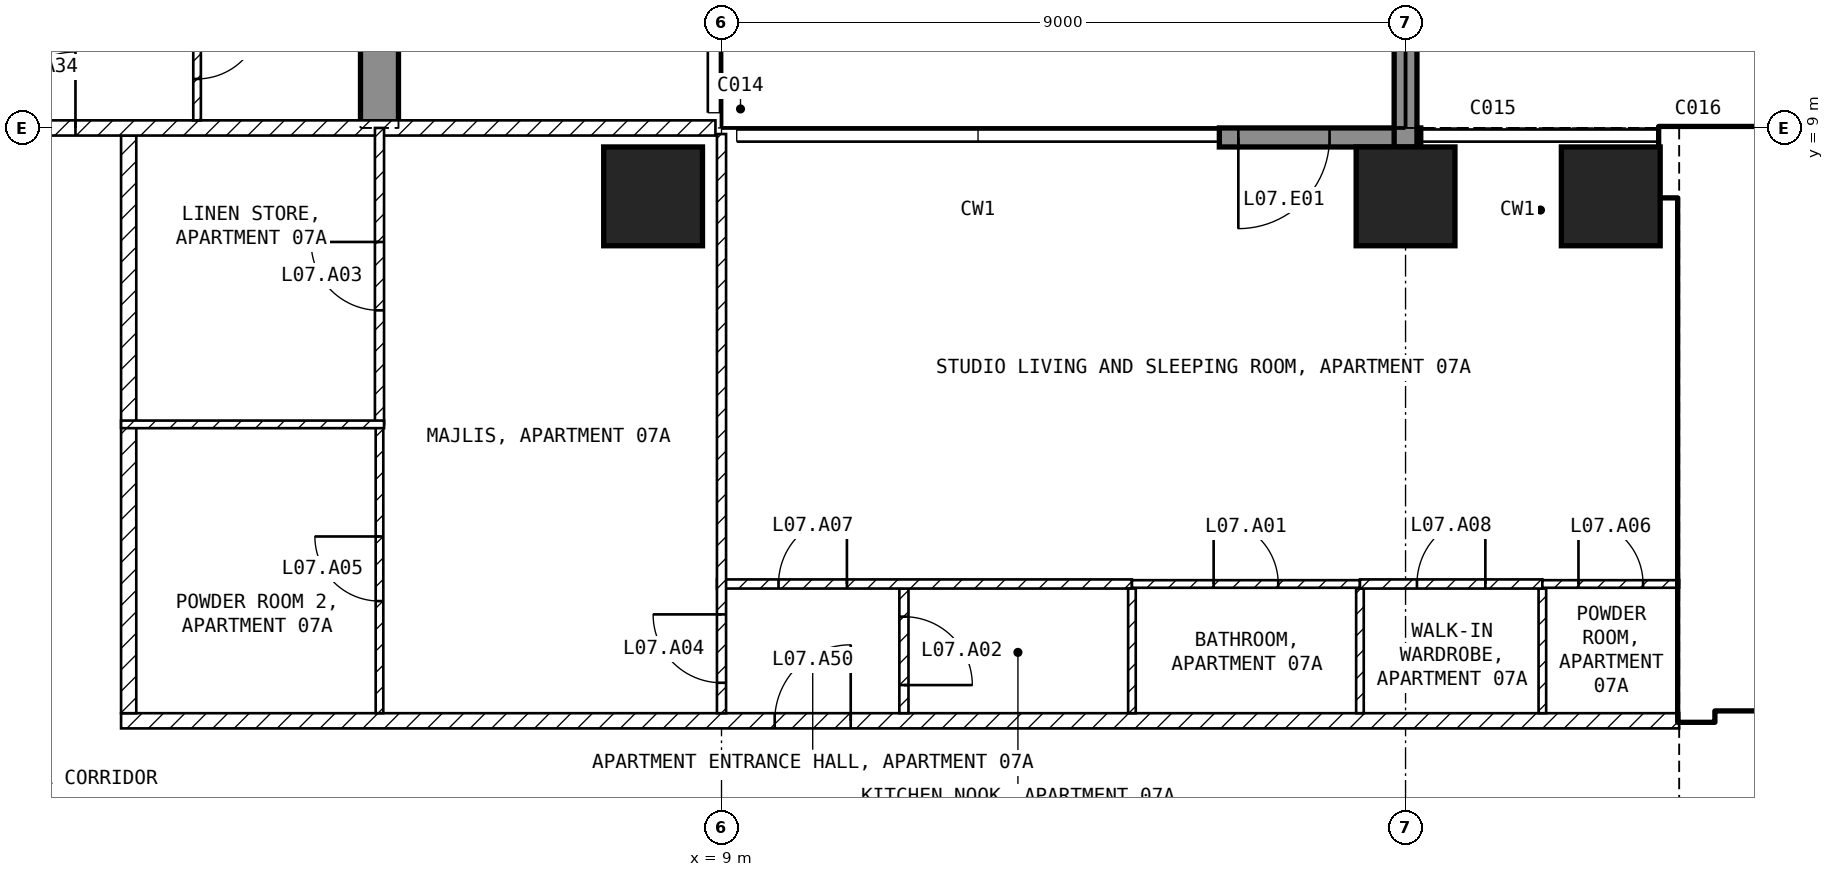
"""IFC4 building model, lengths in metres.
Left out: names, types, materials, properties, quantities, classifications, styles, units other than length and angle.
Written with IfcOpenShell. Run it as: python <this file> out.ifc"""

import sys

from ifc_helpers import new_model, si_unit, direction, frame, frame_2d, origin, origin_2d, place, context, subcontext, project, spatial, polyline, rectangle, outline, extrude, element, fill, save


model = new_model("IFC4")
c1 = context("Model", 3, precision=1e-05, world=origin(), true_north=direction((0.0, 1.0)))
c2 = subcontext(c1, "Body", "Model", "MODEL_VIEW")
j1 = project(units=[si_unit("LENGTHUNIT", "METRE"), si_unit("PLANEANGLEUNIT", "RADIAN")], contexts=[c1])
p1 = place(None, origin())
s1 = spatial("IfcSite", under=j1, at=p1, CompositionType="ELEMENT")
p2 = place(p1, origin())
s2 = spatial("IfcBuilding", under=s1, at=p2, CompositionType="ELEMENT")
p3 = place(p2, frame((0.0, 0.0, 43.5)))
s3 = spatial("IfcBuildingStorey", under=s2, at=p3, CompositionType="ELEMENT", Elevation=43.5)
for number, where, z_axis, x_axis in (
    (1, (8.1, 8.1, -0.25), (0.0, 0.0, 1.0), (1.0, 0.0, 0.0)),
    (2, (18.0, 8.1, -0.25), (0.0, 0.0, 1.0), (1.0, 0.0, 0.0)),
    (3, (20.7, 8.1, -0.25), (0.0, 0.0, 1.0), (1.0, 0.0, 0.0)),
):
    element("IfcColumn", number, at=place(p3, frame(where, z_axis=z_axis, x_axis=x_axis)), inside=s3, PredefinedType="COLUMN", context=c2, shape_type="SweptSolid", body=[
        extrude(rectangle(XDim=1.3, YDim=1.3, at=origin_2d()), origin(), (0.0, 0.0, 1.0), 3.5),
    ])
p4 = place(p3, frame((4.25, 9.0, -0.25), z_axis=(1.0, 0.0, 0.0), x_axis=(0.0, 1.0, 0.0)))
e4 = element("IfcWall", 4, at=p4, inside=s3, PredefinedType="SHEAR", context=c2, shape_type="SweptSolid", body=[
    extrude(outline(polyline([(0.0, 0.0), (2.1, 0.0), (2.1, 2.65), (4.5, 2.65), (4.5, 0.0), (9.9, 0.0), (9.9, 2.65), (12.3, 2.65), (12.3, 0.0), (16.45, 0.0), (16.45, 3.5), (0.0, 3.5), (0.0, 0.0)])), origin(), (0.0, 0.0, 1.0), 0.5),
])
p5 = place(p3, frame((18.2, 8.875, 0.0), z_axis=(0.0, 0.0, 1.0), x_axis=(-1.0, 0.0, 0.0)))
e5 = element("IfcWall", 5, at=p5, inside=s3, PredefinedType="SOLIDWALL", context=c2, shape_type="SweptSolid", body=[
    extrude(rectangle(XDim=2.65, YDim=0.25, at=frame_2d((1.325, 0.0))), origin(), (0.0, 0.0, 1.0), 3.25),
])
p6 = place(p5, frame((1.2, 0.0, 0.0)))
e6 = element("IfcOpeningElement", 6, at=p6, cuts=e5, PredefinedType="OPENING", context=c2, shape_type="SweptSolid", body=[
    extrude(rectangle(XDim=1.2, YDim=2.4, at=frame_2d((0.6, 1.2))), frame((0.0, 0.135, 0.0), z_axis=(0.0, -1.0, 0.0), x_axis=(1.0, 0.0, 0.0)), (0.0, 0.0, 1.0), 0.27),
])
p7 = place(p3, frame((18.0, 8.75, 0.0), z_axis=(0.0, 0.0, 1.0), x_axis=(0.0, 1.0, 0.0)))
e7 = element("IfcWall", 7, at=p7, inside=s3, PredefinedType="SOLIDWALL", context=c2, shape_type="SweptSolid", body=[
    extrude(rectangle(XDim=2.95, YDim=0.3, at=frame_2d((1.475, 0.0))), origin(), (0.0, 0.0, 1.0), 3.25),
])
p8 = place(p3, frame((21.35, 8.55, 0.0), z_axis=(0.0, 0.0, 1.0), x_axis=(1.0, 0.0, 0.0)))
e8 = element("IfcWall", 8, at=p8, inside=s3, PredefinedType="SHEAR", context=c2, shape_type="SweptSolid", body=[
    extrude(rectangle(XDim=10.15, YDim=0.9, at=frame_2d((5.075, 0.0))), origin(), (0.0, 0.0, 1.0), 3.25),
])
p9 = place(p3, frame((21.825, 1.2, 0.0), z_axis=(0.0, 0.0, 1.0), x_axis=(0.0, 1.0, 0.0)))
e9 = element("IfcWall", 9, at=p9, inside=s3, PredefinedType="SHEAR", context=c2, shape_type="SweptSolid", body=[
    extrude(rectangle(XDim=6.9, YDim=0.45, at=frame_2d((3.45, 0.0))), origin(), (0.0, 0.0, 1.0), 3.25),
])
p10 = place(p3, frame((22.05, 1.45, 0.0), z_axis=(0.0, 0.0, 1.0), x_axis=(1.0, 0.0, 0.0)))
e10 = element("IfcWall", 10, at=p10, inside=s3, PredefinedType="SOLIDWALL", context=c2, shape_type="SweptSolid", body=[
    extrude(rectangle(XDim=13.05, YDim=0.2, at=frame_2d((6.525, 0.0))), origin(), (0.0, 0.0, 1.0), 3.25),
])
p11 = place(p10, frame((0.75, 0.0, 0.0)))
e11 = element("IfcOpeningElement", 11, at=p11, cuts=e10, PredefinedType="OPENING", context=c2, shape_type="SweptSolid", body=[
    extrude(rectangle(XDim=1.0, YDim=2.1, at=frame_2d((0.5, 1.05))), frame((0.0, 0.11, 0.0), z_axis=(0.0, -1.0, 0.0), x_axis=(1.0, 0.0, 0.0)), (0.0, 0.0, 1.0), 0.22),
])
p12 = place(p10, frame((3.25, 0.0, 0.0)))
e12 = element("IfcOpeningElement", 12, at=p12, cuts=e10, PredefinedType="OPENING", context=c2, shape_type="SweptSolid", body=[
    extrude(rectangle(XDim=1.0, YDim=2.1, at=frame_2d((0.5, 1.05))), frame((0.0, 0.11, 0.0), z_axis=(0.0, -1.0, 0.0), x_axis=(1.0, 0.0, 0.0)), (0.0, 0.0, 1.0), 0.22),
])
p13 = place(p3, frame((22.05, 5.15, 0.0), z_axis=(0.0, 0.0, 1.0), x_axis=(1.0, 0.0, 0.0)))
e13 = element("IfcWall", 13, at=p13, inside=s3, PredefinedType="SOLIDWALL", context=c2, shape_type="SweptSolid", body=[
    extrude(rectangle(XDim=6.3, YDim=0.2, at=frame_2d((3.15, 0.0))), origin(), (0.0, 0.0, 1.0), 3.25),
])
p14 = place(p13, frame((0.2, 0.0, 0.0)))
e14 = element("IfcOpeningElement", 14, at=p14, cuts=e13, PredefinedType="OPENING", context=c2, shape_type="SweptSolid", body=[
    extrude(rectangle(XDim=1.0, YDim=2.1, at=frame_2d((0.5, 1.05))), frame((0.0, 0.11, 0.0), z_axis=(0.0, -1.0, 0.0), x_axis=(1.0, 0.0, 0.0)), (0.0, 0.0, 1.0), 0.22),
])
p15 = place(p3, frame((1.1, 1.2, 0.0), z_axis=(0.0, 0.0, 1.0), x_axis=(1.0, 0.0, 0.0)))
e15 = element("IfcWall", 15, at=p15, inside=s3, PredefinedType="PARTITIONING", context=c2, shape_type="SweptSolid", body=[
    extrude(rectangle(XDim=20.5, YDim=0.2, at=frame_2d((10.25, 0.0))), origin(), (0.0, 0.0, 1.0), 3.25),
])
p16 = place(p15, frame((8.6, 0.0, 0.0)))
e16 = element("IfcOpeningElement", 16, at=p16, cuts=e15, PredefinedType="OPENING", context=c2, shape_type="SweptSolid", body=[
    extrude(rectangle(XDim=1.0, YDim=2.1, at=frame_2d((0.5, 1.05))), frame((0.0, 0.11, 0.0), z_axis=(0.0, -1.0, 0.0), x_axis=(1.0, 0.0, 0.0)), (0.0, 0.0, 1.0), 0.22),
])
p17 = place(p3, frame((1.2, 8.9, 0.0), z_axis=(0.0, 0.0, 1.0), x_axis=(0.0, -1.0, 0.0)))
e17 = element("IfcWall", 17, at=p17, inside=s3, PredefinedType="PARTITIONING", context=c2, shape_type="SweptSolid", body=[
    extrude(rectangle(XDim=7.6, YDim=0.2, at=frame_2d((3.8, 0.0))), origin(), (0.0, 0.0, 1.0), 3.25),
])
p18 = place(p3, frame((-8.92, 9.0, 0.0), z_axis=(0.0, 0.0, 1.0), x_axis=(1.0, 0.0, 0.0)))
e18 = element("IfcWall", 18, at=p18, inside=s3, PredefinedType="PARTITIONING", context=c2, shape_type="SweptSolid", body=[
    extrude(rectangle(XDim=17.84, YDim=0.2, at=frame_2d((8.92, 0.0))), origin(), (0.0, 0.0, 1.0), 3.25),
])
p19 = place(p18, frame((8.42, 0.0, 0.0)))
e19 = element("IfcOpeningElement", 19, at=p19, cuts=e18, PredefinedType="OPENING", context=c2, shape_type="SweptSolid", body=[
    extrude(rectangle(XDim=1.0, YDim=2.1, at=frame_2d((0.5, 1.05))), frame((0.0, 0.11, 0.0), z_axis=(0.0, -1.0, 0.0), x_axis=(1.0, 0.0, 0.0)), (0.0, 0.0, 1.0), 0.22),
])
p20 = place(p3, frame((11.4, 2.94, 0.0), z_axis=(0.0, 0.0, 1.0), x_axis=(0.0, -1.0, 0.0)))
e20 = element("IfcWall", 20, at=p20, inside=s3, PredefinedType="PARTITIONING", context=c2, shape_type="SweptSolid", body=[
    extrude(rectangle(XDim=1.64, YDim=0.12, at=frame_2d((0.82, 0.0))), origin(), (0.0, 0.0, 1.0), 3.25),
])
p21 = place(p20, frame((0.37, 0.0, 0.0)))
e21 = element("IfcOpeningElement", 21, at=p21, cuts=e20, PredefinedType="OPENING", context=c2, shape_type="SweptSolid", body=[
    extrude(rectangle(XDim=0.9, YDim=2.1, at=frame_2d((0.45, 1.05))), frame((0.0, 0.07, 0.0), z_axis=(0.0, -1.0, 0.0), x_axis=(1.0, 0.0, 0.0)), (0.0, 0.0, 1.0), 0.14),
])
p22 = place(p3, frame((8.94, 3.0, 0.0), z_axis=(0.0, 0.0, 1.0), x_axis=(1.0, 0.0, 0.0)))
e22 = element("IfcWall", 22, at=p22, inside=s3, PredefinedType="PARTITIONING", context=c2, shape_type="SweptSolid", body=[
    extrude(rectangle(XDim=5.46, YDim=0.12, at=frame_2d((2.73, 0.0))), origin(), (0.0, 0.0, 1.0), 3.25),
])
p23 = place(p22, frame((0.81, 0.0, 0.0)))
e23 = element("IfcOpeningElement", 23, at=p23, cuts=e22, PredefinedType="OPENING", context=c2, shape_type="SweptSolid", body=[
    extrude(rectangle(XDim=0.9, YDim=2.1, at=frame_2d((0.45, 1.05))), frame((0.0, 0.07, 0.0), z_axis=(0.0, -1.0, 0.0), x_axis=(1.0, 0.0, 0.0)), (0.0, 0.0, 1.0), 0.14),
])
p24 = place(p3, frame((9.0, 1.3, 0.0), z_axis=(0.0, 0.0, 1.0), x_axis=(0.0, 1.0, 0.0)))
e24 = element("IfcWall", 24, at=p24, inside=s3, PredefinedType="PARTITIONING", context=c2, shape_type="SweptSolid", body=[
    extrude(rectangle(XDim=7.62, YDim=0.12, at=frame_2d((3.81, 0.0))), origin(), (0.0, 0.0, 1.0), 3.25),
])
p25 = place(p24, frame((0.4, 0.0, 0.0)))
e25 = element("IfcOpeningElement", 25, at=p25, cuts=e24, PredefinedType="OPENING", context=c2, shape_type="SweptSolid", body=[
    extrude(rectangle(XDim=0.9, YDim=2.1, at=frame_2d((0.45, 1.05))), frame((0.0, 0.07, 0.0), z_axis=(0.0, -1.0, 0.0), x_axis=(1.0, 0.0, 0.0)), (0.0, 0.0, 1.0), 0.14),
])
for number, where, z_axis, x_axis in (
    (26, (14.4, 2.94, 0.0), (0.0, 0.0, 1.0), (0.0, -1.0, 0.0)),
    (27, (17.4, 2.94, 0.0), (0.0, 0.0, 1.0), (0.0, -1.0, 0.0)),
):
    element("IfcWall", number, at=place(p3, frame(where, z_axis=z_axis, x_axis=x_axis)), inside=s3, PredefinedType="PARTITIONING", context=c2, shape_type="SweptSolid", body=[
        extrude(rectangle(XDim=1.64, YDim=0.1, at=frame_2d((0.82, 0.0))), origin(), (0.0, 0.0, 1.0), 3.25),
    ])
p26 = place(p3, frame((14.4, 3.0, 0.0), z_axis=(0.0, 0.0, 1.0), x_axis=(1.0, 0.0, 0.0)))
e28 = element("IfcWall", 28, at=p26, inside=s3, PredefinedType="PARTITIONING", context=c2, shape_type="SweptSolid", body=[
    extrude(rectangle(XDim=3.0, YDim=0.1, at=frame_2d((1.5, 0.0))), origin(), (0.0, 0.0, 1.0), 3.25),
])
p27 = place(p26, frame((1.075, 0.0, 0.0)))
e29 = element("IfcOpeningElement", 29, at=p27, cuts=e28, PredefinedType="OPENING", context=c2, shape_type="SweptSolid", body=[
    extrude(rectangle(XDim=0.85, YDim=2.1, at=frame_2d((0.425, 1.05))), frame((0.0, 0.06, 0.0), z_axis=(0.0, -1.0, 0.0), x_axis=(1.0, 0.0, 0.0)), (0.0, 0.0, 1.0), 0.12),
])
p28 = place(p3, frame((19.8, 2.94, 0.0), z_axis=(0.0, 0.0, 1.0), x_axis=(0.0, -1.0, 0.0)))
e30 = element("IfcWall", 30, at=p28, inside=s3, PredefinedType="PARTITIONING", context=c2, shape_type="SweptSolid", body=[
    extrude(rectangle(XDim=1.64, YDim=0.1, at=frame_2d((0.82, 0.0))), origin(), (0.0, 0.0, 1.0), 3.25),
])
p29 = place(p3, frame((17.4, 3.0, 0.0), z_axis=(0.0, 0.0, 1.0), x_axis=(1.0, 0.0, 0.0)))
e31 = element("IfcWall", 31, at=p29, inside=s3, PredefinedType="PARTITIONING", context=c2, shape_type="SweptSolid", body=[
    extrude(rectangle(XDim=2.4, YDim=0.12, at=frame_2d((1.2, 0.0))), origin(), (0.0, 0.0, 1.0), 3.25),
])
p30 = place(p29, frame((0.75, 0.0, 0.0)))
e32 = element("IfcOpeningElement", 32, at=p30, cuts=e31, PredefinedType="OPENING", context=c2, shape_type="SweptSolid", body=[
    extrude(rectangle(XDim=0.9, YDim=2.1, at=frame_2d((0.45, 1.05))), frame((0.0, 0.07, 0.0), z_axis=(0.0, -1.0, 0.0), x_axis=(1.0, 0.0, 0.0)), (0.0, 0.0, 1.0), 0.14),
])
p31 = place(p3, frame((19.8, 3.0, 0.0), z_axis=(0.0, 0.0, 1.0), x_axis=(1.0, 0.0, 0.0)))
e33 = element("IfcWall", 33, at=p31, inside=s3, PredefinedType="PARTITIONING", context=c2, shape_type="SweptSolid", body=[
    extrude(rectangle(XDim=1.8, YDim=0.1, at=frame_2d((0.9, 0.0))), origin(), (0.0, 0.0, 1.0), 3.25),
])
p32 = place(p31, frame((0.475, 0.0, 0.0)))
e34 = element("IfcOpeningElement", 34, at=p32, cuts=e33, PredefinedType="OPENING", context=c2, shape_type="SweptSolid", body=[
    extrude(rectangle(XDim=0.85, YDim=2.1, at=frame_2d((0.425, 1.05))), frame((0.0, 0.06, 0.0), z_axis=(0.0, -1.0, 0.0), x_axis=(1.0, 0.0, 0.0)), (0.0, 0.0, 1.0), 0.12),
])
p33 = place(p3, frame((4.5, 1.3, 0.0), z_axis=(0.0, 0.0, 1.0), x_axis=(0.0, 1.0, 0.0)))
e35 = element("IfcWall", 35, at=p33, inside=s3, PredefinedType="PARTITIONING", context=c2, shape_type="SweptSolid", body=[
    extrude(rectangle(XDim=3.8, YDim=0.1, at=frame_2d((1.9, 0.0))), origin(), (0.0, 0.0, 1.0), 3.25),
])
p34 = place(p33, frame((1.475, 0.0, 0.0)))
e36 = element("IfcOpeningElement", 36, at=p34, cuts=e35, PredefinedType="OPENING", context=c2, shape_type="SweptSolid", body=[
    extrude(rectangle(XDim=0.85, YDim=2.1, at=frame_2d((0.425, 1.05))), frame((0.0, 0.06, 0.0), z_axis=(0.0, -1.0, 0.0), x_axis=(1.0, 0.0, 0.0)), (0.0, 0.0, 1.0), 0.12),
])
p35 = place(p3, frame((4.5, 5.1, 0.0), z_axis=(0.0, 0.0, 1.0), x_axis=(0.0, 1.0, 0.0)))
e37 = element("IfcWall", 37, at=p35, inside=s3, PredefinedType="PARTITIONING", context=c2, shape_type="SweptSolid", body=[
    extrude(rectangle(XDim=3.9, YDim=0.12, at=frame_2d((1.95, 0.0))), origin(), (0.0, 0.0, 1.0), 3.25),
])
p36 = place(p35, frame((1.5, 0.0, 0.0)))
e38 = element("IfcOpeningElement", 38, at=p36, cuts=e37, PredefinedType="OPENING", context=c2, shape_type="SweptSolid", body=[
    extrude(rectangle(XDim=0.9, YDim=2.1, at=frame_2d((0.45, 1.05))), frame((0.0, 0.07, 0.0), z_axis=(0.0, -1.0, 0.0), x_axis=(1.0, 0.0, 0.0)), (0.0, 0.0, 1.0), 0.14),
])
p37 = place(p3, frame((1.1, 5.1, 0.0), z_axis=(0.0, 0.0, 1.0), x_axis=(1.0, 0.0, 0.0)))
e39 = element("IfcWall", 39, at=p37, inside=s3, PredefinedType="PARTITIONING", context=c2, shape_type="SweptSolid", body=[
    extrude(rectangle(XDim=3.46, YDim=0.1, at=frame_2d((1.73, 0.0))), origin(), (0.0, 0.0, 1.0), 3.25),
])
p38 = place(p3, frame((2.1, 11.04, 0.0), z_axis=(0.0, 0.0, 1.0), x_axis=(0.0, -1.0, 0.0)))
e40 = element("IfcWall", 40, at=p38, inside=s3, PredefinedType="PARTITIONING", context=c2, shape_type="SweptSolid", body=[
    extrude(rectangle(XDim=1.94, YDim=0.1, at=frame_2d((0.97, 0.0))), origin(), (0.0, 0.0, 1.0), 3.25),
])
p39 = place(p38, frame((0.545, 0.0, 0.0)))
e41 = element("IfcOpeningElement", 41, at=p39, cuts=e40, PredefinedType="OPENING", context=c2, shape_type="SweptSolid", body=[
    extrude(rectangle(XDim=0.85, YDim=2.1, at=frame_2d((0.425, 1.05))), frame((0.0, 0.06, 0.0), z_axis=(0.0, -1.0, 0.0), x_axis=(1.0, 0.0, 0.0)), (0.0, 0.0, 1.0), 0.12),
])
p40 = place(p6, origin())
e42 = element("IfcDoor", 42, at=p40, inside=s3, OperationType="SINGLE_SWING_RIGHT", PredefinedType="DOOR", context=c2, shape_type="SweptSolid", body=[
    extrude(rectangle(XDim=1.2, YDim=2.4, at=frame_2d((0.6, 1.2))), frame((0.0, 0.025, 0.0), z_axis=(0.0, -1.0, 0.0), x_axis=(1.0, 0.0, 0.0)), (0.0, 0.0, 1.0), 0.05),
])
fill(e6, e42)
p41 = place(p14, origin())
e43 = element("IfcDoor", 43, at=p41, inside=s3, OperationType="SINGLE_SWING_LEFT", PredefinedType="DOOR", context=c2, shape_type="SweptSolid", body=[
    extrude(rectangle(XDim=1.0, YDim=2.1, at=frame_2d((0.5, 1.05))), frame((0.0, 0.025, 0.0), z_axis=(0.0, -1.0, 0.0), x_axis=(1.0, 0.0, 0.0)), (0.0, 0.0, 1.0), 0.05),
])
fill(e14, e43)
p42 = place(p27, origin())
e44 = element("IfcDoor", 44, at=p42, inside=s3, OperationType="SINGLE_SWING_LEFT", PredefinedType="DOOR", context=c2, shape_type="SweptSolid", body=[
    extrude(rectangle(XDim=0.85, YDim=2.1, at=frame_2d((0.425, 1.05))), frame((0.0, 0.025, 0.0), z_axis=(0.0, -1.0, 0.0), x_axis=(1.0, 0.0, 0.0)), (0.0, 0.0, 1.0), 0.05),
])
fill(e29, e44)
p43 = place(p21, origin())
e45 = element("IfcDoor", 45, at=p43, inside=s3, OperationType="SINGLE_SWING_RIGHT", PredefinedType="DOOR", context=c2, shape_type="SweptSolid", body=[
    extrude(rectangle(XDim=0.9, YDim=2.1, at=frame_2d((0.45, 1.05))), frame((0.0, 0.025, 0.0), z_axis=(0.0, -1.0, 0.0), x_axis=(1.0, 0.0, 0.0)), (0.0, 0.0, 1.0), 0.05),
])
fill(e21, e45)
p44 = place(p36, origin())
e46 = element("IfcDoor", 46, at=p44, inside=s3, OperationType="SINGLE_SWING_RIGHT", PredefinedType="DOOR", context=c2, shape_type="SweptSolid", body=[
    extrude(rectangle(XDim=0.9, YDim=2.1, at=frame_2d((0.45, 1.05))), frame((0.0, 0.025, 0.0), z_axis=(0.0, -1.0, 0.0), x_axis=(1.0, 0.0, 0.0)), (0.0, 0.0, 1.0), 0.05),
])
fill(e38, e46)
p45 = place(p25, origin())
e47 = element("IfcDoor", 47, at=p45, inside=s3, OperationType="SINGLE_SWING_RIGHT", PredefinedType="DOOR", context=c2, shape_type="SweptSolid", body=[
    extrude(rectangle(XDim=0.9, YDim=2.1, at=frame_2d((0.45, 1.05))), frame((0.0, 0.025, 0.0), z_axis=(0.0, -1.0, 0.0), x_axis=(1.0, 0.0, 0.0)), (0.0, 0.0, 1.0), 0.05),
])
fill(e25, e47)
p46 = place(p34, origin())
e48 = element("IfcDoor", 48, at=p46, inside=s3, OperationType="SINGLE_SWING_RIGHT", PredefinedType="DOOR", context=c2, shape_type="SweptSolid", body=[
    extrude(rectangle(XDim=0.85, YDim=2.1, at=frame_2d((0.425, 1.05))), frame((0.0, 0.025, 0.0), z_axis=(0.0, -1.0, 0.0), x_axis=(1.0, 0.0, 0.0)), (0.0, 0.0, 1.0), 0.05),
])
fill(e36, e48)
p47 = place(p32, origin())
e49 = element("IfcDoor", 49, at=p47, inside=s3, OperationType="SINGLE_SWING_LEFT", PredefinedType="DOOR", context=c2, shape_type="SweptSolid", body=[
    extrude(rectangle(XDim=0.85, YDim=2.1, at=frame_2d((0.425, 1.05))), frame((0.0, 0.025, 0.0), z_axis=(0.0, -1.0, 0.0), x_axis=(1.0, 0.0, 0.0)), (0.0, 0.0, 1.0), 0.05),
])
fill(e34, e49)
p48 = place(p23, origin())
e50 = element("IfcDoor", 50, at=p48, inside=s3, OperationType="SINGLE_SWING_RIGHT", PredefinedType="DOOR", context=c2, shape_type="SweptSolid", body=[
    extrude(rectangle(XDim=0.9, YDim=2.1, at=frame_2d((0.45, 1.05))), frame((0.0, 0.025, 0.0), z_axis=(0.0, -1.0, 0.0), x_axis=(1.0, 0.0, 0.0)), (0.0, 0.0, 1.0), 0.05),
])
fill(e23, e50)
p49 = place(p30, origin())
e51 = element("IfcDoor", 51, at=p49, inside=s3, OperationType="SINGLE_SWING_RIGHT", PredefinedType="DOOR", context=c2, shape_type="SweptSolid", body=[
    extrude(rectangle(XDim=0.9, YDim=2.1, at=frame_2d((0.45, 1.05))), frame((0.0, 0.025, 0.0), z_axis=(0.0, -1.0, 0.0), x_axis=(1.0, 0.0, 0.0)), (0.0, 0.0, 1.0), 0.05),
])
fill(e32, e51)
p50 = place(p19, origin())
e52 = element("IfcDoor", 52, at=p50, inside=s3, OperationType="SINGLE_SWING_RIGHT", PredefinedType="DOOR", context=c2, shape_type="SweptSolid", body=[
    extrude(rectangle(XDim=1.0, YDim=2.1, at=frame_2d((0.5, 1.05))), frame((0.0, 0.025, 0.0), z_axis=(0.0, -1.0, 0.0), x_axis=(1.0, 0.0, 0.0)), (0.0, 0.0, 1.0), 0.05),
])
fill(e19, e52)
p51 = place(p39, origin())
e53 = element("IfcDoor", 53, at=p51, inside=s3, OperationType="SINGLE_SWING_LEFT", PredefinedType="DOOR", context=c2, shape_type="SweptSolid", body=[
    extrude(rectangle(XDim=0.85, YDim=2.1, at=frame_2d((0.425, 1.05))), frame((0.0, 0.025, 0.0), z_axis=(0.0, -1.0, 0.0), x_axis=(1.0, 0.0, 0.0)), (0.0, 0.0, 1.0), 0.05),
])
fill(e41, e53)
p52 = place(p16, origin())
e54 = element("IfcDoor", 54, at=p52, inside=s3, OperationType="SINGLE_SWING_RIGHT", PredefinedType="DOOR", context=c2, shape_type="SweptSolid", body=[
    extrude(rectangle(XDim=1.0, YDim=2.1, at=frame_2d((0.5, 1.05))), frame((0.0, 0.025, 0.0), z_axis=(0.0, -1.0, 0.0), x_axis=(1.0, 0.0, 0.0)), (0.0, 0.0, 1.0), 0.05),
])
fill(e16, e54)
save(model, sys.argv[1])
